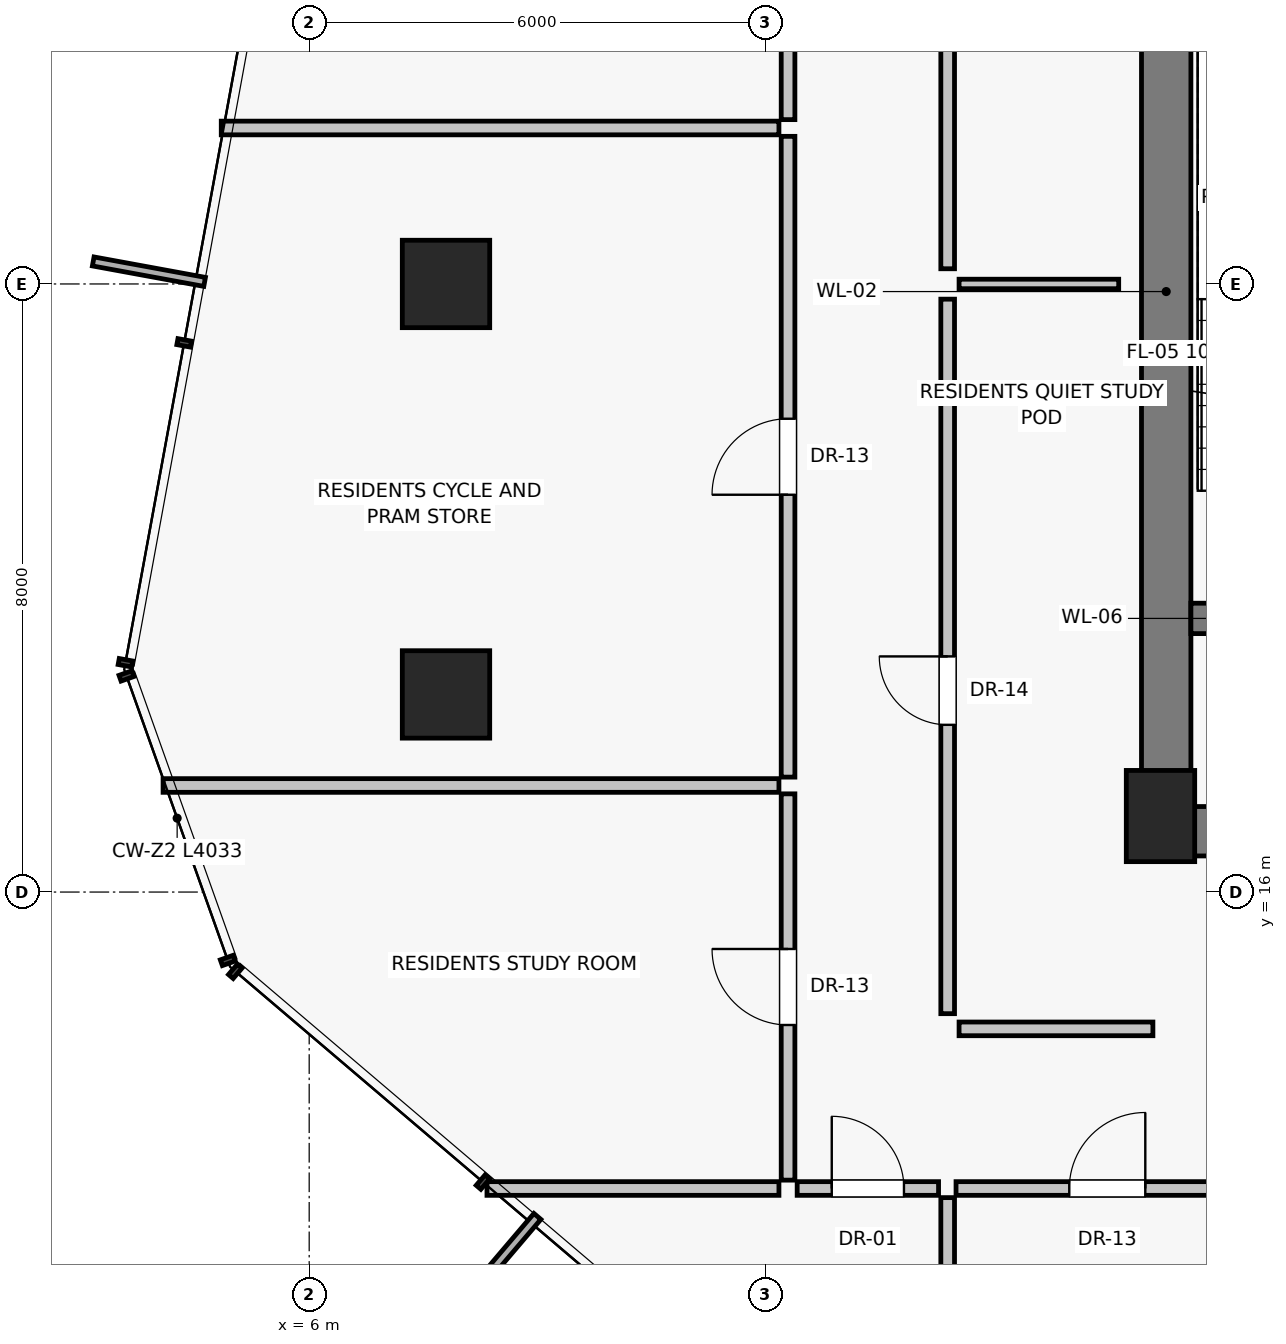
"""IFC4 building model, lengths in metres.
Left out: names, types, materials, properties, quantities, classifications, styles, units other than length and angle.
Written with IfcOpenShell. Run it as: python <this file> out.ifc"""

import sys

from ifc_helpers import new_model, si_unit, direction, frame, frame_2d, origin, origin_2d, place, context, subcontext, project, spatial, rectangle, extrude, source, transform, mapped, element, fill, save


model = new_model("IFC4")
c1 = context("Model", 3, precision=1e-05, world=origin(), true_north=direction((0.0, 1.0)))
c2 = subcontext(c1, "Body", "Model", "MODEL_VIEW")
j1 = project(units=[si_unit("LENGTHUNIT", "METRE"), si_unit("PLANEANGLEUNIT", "RADIAN")], contexts=[c1])
p1 = place(None, origin())
s1 = spatial("IfcSite", under=j1, at=p1, CompositionType="ELEMENT")
p2 = place(p1, origin())
s2 = spatial("IfcBuilding", under=s1, at=p2, CompositionType="ELEMENT")
p3 = place(p2, frame((0.0, 0.0, 92.7)))
s3 = spatial("IfcBuildingStorey", under=s2, at=p3, CompositionType="ELEMENT", Elevation=92.7)
p4 = place(p3, frame((17.2, 17.0, 0.0), z_axis=(0.0, 0.0, 1.0), x_axis=(1.0, 0.0, 0.0)))
e1 = element("IfcColumn", 1, at=p4, inside=s3, PredefinedType="PILASTER", context=c2, shape_type="SweptSolid", body=[
    extrude(rectangle(XDim=0.9, YDim=1.2, at=origin_2d()), origin(), (0.0, 0.0, 1.0), 3.25),
])
for number, where, z_axis, x_axis in (
    (2, (7.8, 24.0, 0.0), (0.0, 0.0, 1.0), (1.0, 0.0, 0.0)),
    (3, (7.8, 18.6, 0.0), (0.0, 0.0, 1.0), (1.0, 0.0, 0.0)),
):
    element("IfcColumn", number, at=place(p3, frame(where, z_axis=z_axis, x_axis=x_axis)), inside=s3, PredefinedType="COLUMN", context=c2, shape_type="SweptSolid", body=[
        extrude(rectangle(XDim=1.15, YDim=1.15, at=origin_2d()), origin(), (0.0, 0.0, 1.0), 3.25),
    ])
p5 = place(p3, frame((17.275, 16.8, 0.0), z_axis=(0.0, 0.0, 1.0), x_axis=(0.0, 1.0, 0.0)))
e4 = element("IfcWall", 4, at=p5, inside=s3, PredefinedType="SHEAR", context=c2, shape_type="SweptSolid", body=[
    extrude(rectangle(XDim=14.2, YDim=0.65, at=frame_2d((7.1, 0.0))), origin(), (0.0, 0.0, 1.0), 3.0),
])
p6 = place(p3, frame((17.2, 16.8, 0.0), z_axis=(0.0, 0.0, 1.0), x_axis=(1.0, 0.0, 0.0)))
e5 = element("IfcWall", 5, at=p6, inside=s3, PredefinedType="SHEAR", context=c2, shape_type="SweptSolid", body=[
    extrude(rectangle(XDim=5.85, YDim=0.65, at=frame_2d((2.925, 0.0))), origin(), (0.0, 0.0, 1.0), 3.0),
])
p7 = place(p6, frame((1.15, 0.0, 0.0)))
e6 = element("IfcOpeningElement", 6, at=p7, cuts=e5, PredefinedType="OPENING", context=c2, shape_type="SweptSolid", body=[
    extrude(rectangle(XDim=1.2, YDim=2.03, at=frame_2d((0.6, 1.015))), frame((0.0, 0.335, 0.0), z_axis=(0.0, -1.0, 0.0), x_axis=(1.0, 0.0, 0.0)), (0.0, 0.0, 1.0), 0.67),
])
p8 = place(p3, frame((17.6, 19.6, 0.0), z_axis=(0.0, 0.0, 1.0), x_axis=(1.0, 0.0, 0.0)))
e7 = element("IfcWall", 7, at=p8, inside=s3, PredefinedType="SHEAR", context=c2, shape_type="SweptSolid", body=[
    extrude(rectangle(XDim=3.4, YDim=0.4, at=frame_2d((1.7, 0.0))), origin(), (0.0, 0.0, 1.0), 3.0),
])
p9 = place(p8, frame((1.05, 0.0, 0.0)))
e8 = element("IfcOpeningElement", 8, at=p9, cuts=e7, PredefinedType="OPENING", context=c2, shape_type="SweptSolid", body=[
    extrude(rectangle(XDim=1.1, YDim=2.03, at=frame_2d((0.55, 1.015))), frame((0.0, 0.21, 0.0), z_axis=(0.0, -1.0, 0.0), x_axis=(1.0, 0.0, 0.0)), (0.0, 0.0, 1.0), 0.42),
])
p10 = place(p3, frame((14.4, 14.4, 0.0), z_axis=(0.0, 0.0, 1.0), x_axis=(0.0, 1.0, 0.0)))
e9 = element("IfcWall", 9, at=p10, inside=s3, PredefinedType="PARTITIONING", context=c2, shape_type="SweptSolid", body=[
    extrude(rectangle(XDim=9.4, YDim=0.18, at=frame_2d((4.7, 0.0))), origin(), (0.0, 0.0, 1.0), 3.0),
])
p11 = place(p10, frame((3.8, 0.0, 0.0)))
e10 = element("IfcOpeningElement", 10, at=p11, cuts=e9, PredefinedType="OPENING", context=c2, shape_type="SweptSolid", body=[
    extrude(rectangle(XDim=0.9, YDim=2.01, at=frame_2d((0.45, 1.005))), frame((0.0, 0.1, 0.0), z_axis=(0.0, -1.0, 0.0), x_axis=(1.0, 0.0, 0.0)), (0.0, 0.0, 1.0), 0.2),
])
p12 = place(p3, frame((14.4, 24.2, 0.0), z_axis=(0.0, 0.0, 1.0), x_axis=(0.0, 1.0, 0.0)))
e11 = element("IfcWall", 11, at=p12, inside=s3, PredefinedType="PARTITIONING", context=c2, shape_type="SweptSolid", body=[
    extrude(rectangle(XDim=9.2, YDim=0.18, at=frame_2d((4.6, 0.0))), origin(), (0.0, 0.0, 1.0), 3.0),
])
p13 = place(p12, frame((3.8, 0.0, 0.0)))
e12 = element("IfcOpeningElement", 12, at=p13, cuts=e11, PredefinedType="OPENING", context=c2, shape_type="SweptSolid", body=[
    extrude(rectangle(XDim=0.9, YDim=2.01, at=frame_2d((0.45, 1.005))), frame((0.0, 0.1, 0.0), z_axis=(0.0, -1.0, 0.0), x_axis=(1.0, 0.0, 0.0)), (0.0, 0.0, 1.0), 0.2),
])
p14 = place(p3, frame((14.55, 24.0, 0.0), z_axis=(0.0, 0.0, 1.0), x_axis=(1.0, 0.0, 0.0)))
e13 = element("IfcWall", 13, at=p14, inside=s3, PredefinedType="PARTITIONING", context=c2, shape_type="SweptSolid", body=[
    extrude(rectangle(XDim=2.1, YDim=0.125, at=frame_2d((1.05, 0.0))), origin(), (0.0, 0.0, 1.0), 3.0),
])
p15 = place(p3, frame((14.55, 14.2, 0.0), z_axis=(0.0, 0.0, 1.0), x_axis=(1.0, 0.0, 0.0)))
e14 = element("IfcWall", 14, at=p15, inside=s3, PredefinedType="PARTITIONING", context=c2, shape_type="SweptSolid", body=[
    extrude(rectangle(XDim=2.55, YDim=0.18, at=frame_2d((1.275, 0.0))), origin(), (0.0, 0.0, 1.0), 3.0),
])
p16 = place(p3, frame((14.4, 11.98, 0.0), z_axis=(0.0, 0.0, 1.0), x_axis=(0.0, -1.0, 0.0)))
e15 = element("IfcWall", 15, at=p16, inside=s3, PredefinedType="PARTITIONING", context=c2, shape_type="SweptSolid", body=[
    extrude(rectangle(XDim=5.038, YDim=0.18, at=frame_2d((2.519, 0.0))), origin(), (0.0, 0.0, 1.0), 3.0),
])
p17 = place(p3, frame((14.51, 12.1, 0.0), z_axis=(0.0, 0.0, 1.0), x_axis=(1.0, 0.0, 0.0)))
e16 = element("IfcWall", 16, at=p17, inside=s3, PredefinedType="PARTITIONING", context=c2, shape_type="SweptSolid", body=[
    extrude(rectangle(XDim=3.98, YDim=0.18, at=frame_2d((1.99, 0.0))), origin(), (0.0, 0.0, 1.0), 2.58),
])
p18 = place(p17, frame((1.49, 0.0, 0.0)))
e17 = element("IfcOpeningElement", 17, at=p18, cuts=e16, PredefinedType="OPENING", context=c2, shape_type="SweptSolid", body=[
    extrude(rectangle(XDim=1.0, YDim=2.01, at=frame_2d((0.5, 1.005))), frame((0.0, 0.1, 0.0), z_axis=(0.0, -1.0, 0.0), x_axis=(1.0, 0.0, 0.0)), (0.0, 0.0, 1.0), 0.2),
])
p19 = place(p3, frame((12.18, 12.1, 0.0), z_axis=(0.0, 0.0, 1.0), x_axis=(-1.0, 0.0, 0.0)))
e18 = element("IfcWall", 18, at=p19, inside=s3, PredefinedType="PARTITIONING", context=c2, shape_type="SweptSolid", body=[
    extrude(rectangle(XDim=3.841, YDim=0.18, at=frame_2d((1.92, 0.0))), origin(), (0.0, 0.0, 1.0), 3.0),
])
p20 = place(p3, frame((12.3, 12.21, 0.0), z_axis=(0.0, 0.0, 1.0), x_axis=(0.0, 1.0, 0.0)))
e19 = element("IfcWall", 19, at=p20, inside=s3, PredefinedType="PARTITIONING", context=c2, shape_type="SweptSolid", body=[
    extrude(rectangle(XDim=5.082, YDim=0.18, at=frame_2d((2.541, 0.0))), origin(), (0.0, 0.0, 1.0), 3.0),
])
p21 = place(p20, frame((2.041, 0.0, 0.0)))
e20 = element("IfcOpeningElement", 20, at=p21, cuts=e19, PredefinedType="OPENING", context=c2, shape_type="SweptSolid", body=[
    extrude(rectangle(XDim=1.0, YDim=2.01, at=frame_2d((0.5, 1.005))), frame((0.0, 0.1, 0.0), z_axis=(0.0, -1.0, 0.0), x_axis=(1.0, 0.0, 0.0)), (0.0, 0.0, 1.0), 0.2),
])
p22 = place(p3, frame((12.3, 17.512, 0.0), z_axis=(0.0, 0.0, 1.0), x_axis=(0.0, 1.0, 0.0)))
e21 = element("IfcWall", 21, at=p22, inside=s3, PredefinedType="PARTITIONING", context=c2, shape_type="SweptSolid", body=[
    extrude(rectangle(XDim=8.43, YDim=0.18, at=frame_2d((4.215, 0.0))), origin(), (0.0, 0.0, 1.0), 2.58),
])
p23 = place(p22, frame((3.715, 0.0, 0.0)))
e22 = element("IfcOpeningElement", 22, at=p23, cuts=e21, PredefinedType="OPENING", context=c2, shape_type="SweptSolid", body=[
    extrude(rectangle(XDim=1.0, YDim=2.01, at=frame_2d((0.5, 1.005))), frame((0.0, 0.1, 0.0), z_axis=(0.0, -1.0, 0.0), x_axis=(1.0, 0.0, 0.0)), (0.0, 0.0, 1.0), 0.2),
])
p24 = place(p3, frame((12.18, 17.402, 0.0), z_axis=(0.0, 0.0, 1.0), x_axis=(-1.0, 0.0, 0.0)))
e23 = element("IfcWall", 23, at=p24, inside=s3, PredefinedType="PARTITIONING", context=c2, shape_type="SweptSolid", body=[
    extrude(rectangle(XDim=8.102, YDim=0.18, at=frame_2d((4.051, 0.0))), origin(), (0.0, 0.0, 1.0), 2.378),
])
p25 = place(p3, frame((12.18, 26.052, 0.0), z_axis=(0.0, 0.0, 1.0), x_axis=(-1.0, 0.0, 0.0)))
e24 = element("IfcWall", 24, at=p25, inside=s3, PredefinedType="PARTITIONING", context=c2, shape_type="SweptSolid", body=[
    extrude(rectangle(XDim=7.337, YDim=0.18, at=frame_2d((3.668, 0.0))), origin(), (0.0, 0.0, 1.0), 3.0),
])
p26 = place(p3, frame((12.3, 26.162, 0.0), z_axis=(0.0, 0.0, 1.0), x_axis=(0.0, 1.0, 0.0)))
e25 = element("IfcWall", 25, at=p26, inside=s3, PredefinedType="PARTITIONING", context=c2, shape_type="SweptSolid", body=[
    extrude(rectangle(XDim=3.446, YDim=0.18, at=frame_2d((1.723, 0.0))), origin(), (0.0, 0.0, 1.0), 2.58),
])
p27 = place(p26, frame((1.223, 0.0, 0.0)))
e26 = element("IfcOpeningElement", 26, at=p27, cuts=e25, PredefinedType="OPENING", context=c2, shape_type="SweptSolid", body=[
    extrude(rectangle(XDim=1.0, YDim=2.01, at=frame_2d((0.5, 1.005))), frame((0.0, 0.1, 0.0), z_axis=(0.0, -1.0, 0.0), x_axis=(1.0, 0.0, 0.0)), (0.0, 0.0, 1.0), 0.2),
])
p28 = place(p3, frame((12.42, 12.1, 0.0), z_axis=(0.0, 0.0, 1.0), x_axis=(1.0, 0.0, 0.0)))
e27 = element("IfcWall", 27, at=p28, inside=s3, PredefinedType="PARTITIONING", context=c2, shape_type="SweptSolid", body=[
    extrude(rectangle(XDim=1.86, YDim=0.18, at=frame_2d((0.93, 0.0))), origin(), (0.0, 0.0, 1.0), 3.0),
])
p29 = place(p28, frame((0.455, 0.0, 0.0)))
e28 = element("IfcOpeningElement", 28, at=p29, cuts=e27, PredefinedType="OPENING", context=c2, shape_type="SweptSolid", body=[
    extrude(rectangle(XDim=0.95, YDim=2.02, at=frame_2d((0.475, 1.01))), frame((0.0, 0.1, 0.0), z_axis=(0.0, -1.0, 0.0), x_axis=(1.0, 0.0, 0.0)), (0.0, 0.0, 1.0), 0.2),
])
m1 = source(origin(), c2, "Body", "SweptSolid", [
    extrude(rectangle(XDim=0.9, YDim=2.01, at=frame_2d((0.45, 1.005))), frame((0.0, 0.025, 0.0), z_axis=(0.0, -1.0, 0.0), x_axis=(1.0, 0.0, 0.0)), (0.0, 0.0, 1.0), 0.05),
])
p30 = place(p11, origin())
e29 = element("IfcDoor", 29, at=p30, inside=s3, OperationType="SINGLE_SWING_RIGHT", PredefinedType="DOOR", context=c2, shape_type="MappedRepresentation", body=[
    mapped(m1, transform((0.0, 0.0, 0.0), scale=1.0)),
])
fill(e10, e29)
m2 = source(origin(), c2, "Body", "SweptSolid", [
    extrude(rectangle(XDim=1.0, YDim=2.01, at=frame_2d((0.5, 1.005))), frame((0.0, 0.025, 0.0), z_axis=(0.0, -1.0, 0.0), x_axis=(1.0, 0.0, 0.0)), (0.0, 0.0, 1.0), 0.05),
])
p31 = place(p18, origin())
e30 = element("IfcDoor", 30, at=p31, inside=s3, OperationType="SINGLE_SWING_RIGHT", PredefinedType="DOOR", context=c2, shape_type="MappedRepresentation", body=[
    mapped(m2, transform((0.0, 0.0, 0.0), scale=1.0)),
])
fill(e17, e30)
p32 = place(p21, origin())
e31 = element("IfcDoor", 31, at=p32, inside=s3, OperationType="SINGLE_SWING_RIGHT", PredefinedType="DOOR", context=c2, shape_type="MappedRepresentation", body=[
    mapped(m2, transform((0.0, 0.0, 0.0), scale=1.0)),
])
fill(e20, e31)
p33 = place(p23, origin())
e32 = element("IfcDoor", 32, at=p33, inside=s3, OperationType="SINGLE_SWING_LEFT", PredefinedType="DOOR", context=c2, shape_type="MappedRepresentation", body=[
    mapped(m2, transform((0.0, 0.0, 0.0), scale=1.0)),
])
fill(e22, e32)
m3 = source(origin(), c2, "Body", "SweptSolid", [
    extrude(rectangle(XDim=0.95, YDim=2.02, at=frame_2d((0.475, 1.01))), frame((0.0, 0.025, 0.0), z_axis=(0.0, -1.0, 0.0), x_axis=(1.0, 0.0, 0.0)), (0.0, 0.0, 1.0), 0.05),
])
p34 = place(p29, origin())
e33 = element("IfcDoor", 33, at=p34, inside=s3, OperationType="SINGLE_SWING_LEFT", PredefinedType="DOOR", context=c2, shape_type="MappedRepresentation", body=[
    mapped(m3, transform((0.0, 0.0, 0.0), scale=1.0)),
])
fill(e28, e33)
save(model, sys.argv[1])
